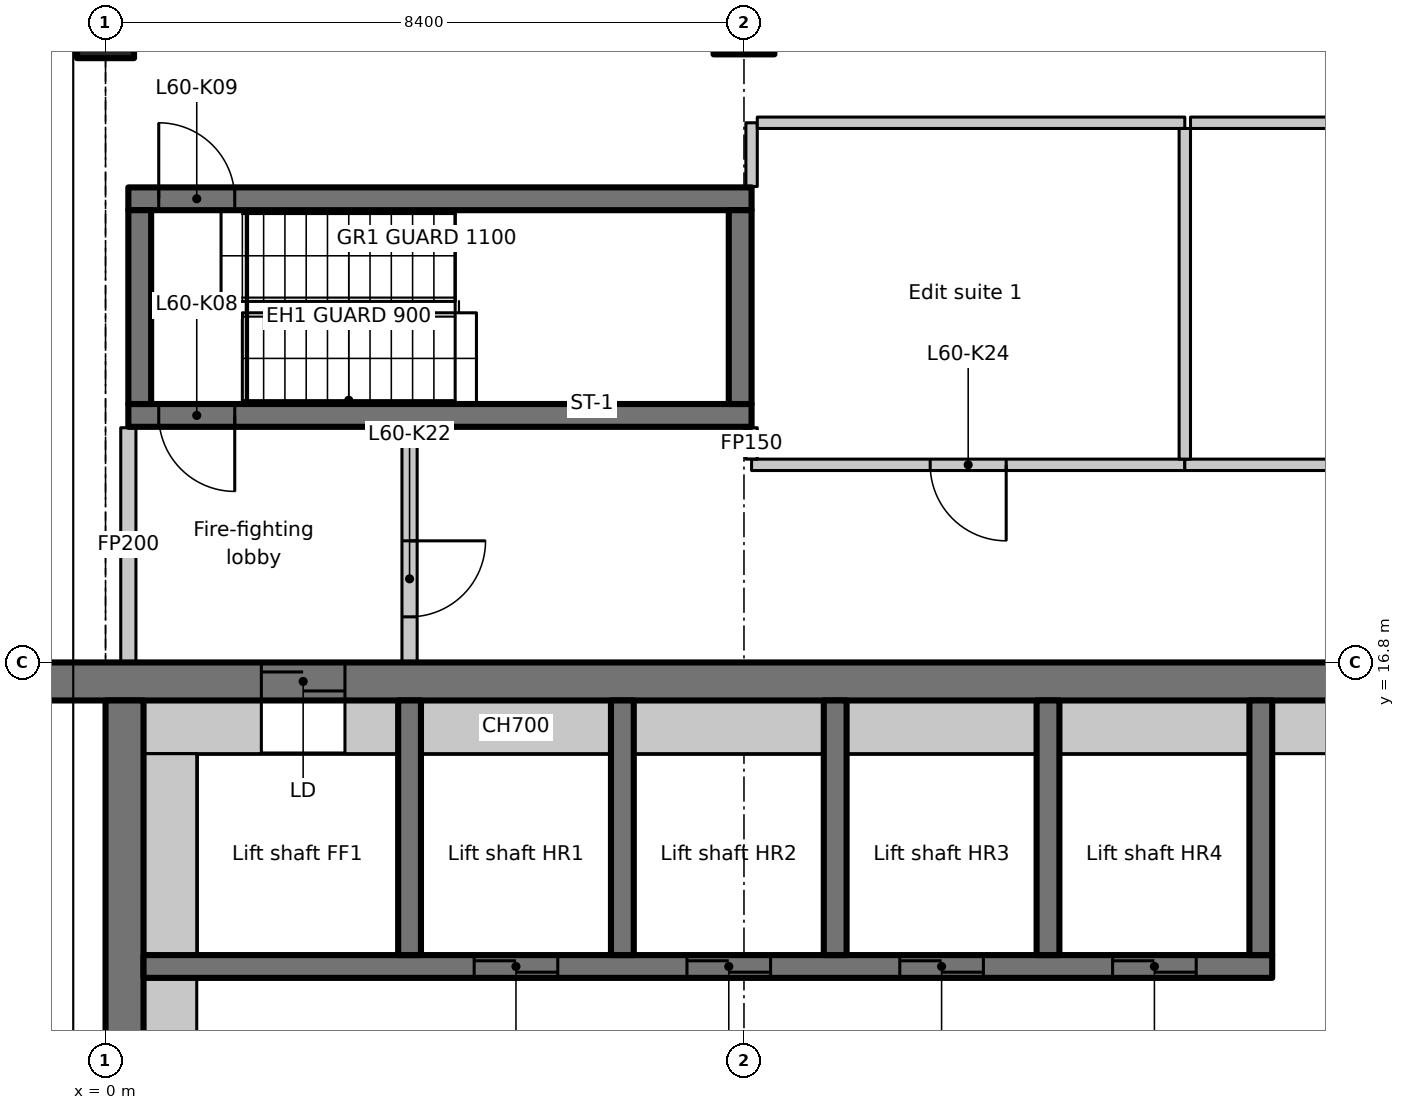
"""IFC4 building model, lengths in metres.
Left out: names, types, materials, properties, quantities, classifications, styles, units other than length and angle.
Written with IfcOpenShell. Run it as: python <this file> out.ifc"""

import sys

from ifc_helpers import new_model, si_unit, direction, frame, frame_2d, origin, origin_2d, place, context, subcontext, project, spatial, rectangle, extrude, element, fill, save


model = new_model("IFC4")
c1 = context("Model", 3, precision=1e-05, world=origin(), true_north=direction((0.0, 1.0)))
c2 = subcontext(c1, "Body", "Model", "MODEL_VIEW")
j1 = project(units=[si_unit("LENGTHUNIT", "METRE"), si_unit("PLANEANGLEUNIT", "RADIAN")], contexts=[c1])
p1 = place(None, origin())
s1 = spatial("IfcSite", under=j1, at=p1, CompositionType="ELEMENT")
p2 = place(p1, origin())
s2 = spatial("IfcBuilding", under=s1, at=p2, CompositionType="ELEMENT")
p3 = place(p2, frame((0.0, 0.0, 237.3)))
s3 = spatial("IfcBuildingStorey", under=s2, at=p3, CompositionType="ELEMENT", Elevation=237.3)
p4 = place(p3, frame((0.0, 25.2, 0.0), z_axis=(0.0, 0.0, 1.0), x_axis=(1.0, 0.0, 0.0)))
e1 = element("IfcColumn", 1, at=p4, inside=s3, PredefinedType="COLUMN", context=c2, shape_type="SweptSolid", body=[
    extrude(rectangle(XDim=0.75, YDim=0.9, at=origin_2d()), origin(), (0.0, 0.0, 1.0), 3.35),
])
p5 = place(p3, frame((8.4, 25.2, 0.0), z_axis=(0.0, 0.0, 1.0), x_axis=(1.0, 0.0, 0.0)))
e2 = element("IfcColumn", 2, at=p5, inside=s3, PredefinedType="COLUMN", context=c2, shape_type="SweptSolid", body=[
    extrude(rectangle(XDim=0.8, YDim=0.8, at=origin_2d()), origin(), (0.0, 0.0, 1.0), 3.35),
])
p6 = place(p3, frame((-1.1, 16.55, 0.0), z_axis=(0.0, 0.0, 1.0), x_axis=(1.0, 0.0, 0.0)))
e3 = element("IfcWall", 3, at=p6, inside=s3, PredefinedType="SHEAR", context=c2, shape_type="SweptSolid", body=[
    extrude(rectangle(XDim=22.1, YDim=0.5, at=frame_2d((11.05, 0.0))), origin(), (0.0, 0.0, 1.0), 3.35),
])
p7 = place(p6, frame((3.15, 0.0, 0.0)))
e4 = element("IfcOpeningElement", 4, at=p7, cuts=e3, PredefinedType="OPENING", context=c2, shape_type="SweptSolid", body=[
    extrude(rectangle(XDim=1.1, YDim=2.3, at=frame_2d((0.55, 1.15))), frame((0.0, 0.26, 0.0), z_axis=(0.0, -1.0, 0.0), x_axis=(1.0, 0.0, 0.0)), (0.0, 0.0, 1.0), 0.52),
])
p8 = place(p3, frame((0.25, 7.436, 0.0), z_axis=(0.0, 0.0, 1.0), x_axis=(0.0, 1.0, 0.0)))
e5 = element("IfcWall", 5, at=p8, inside=s3, PredefinedType="SHEAR", context=c2, shape_type="SweptSolid", body=[
    extrude(rectangle(XDim=8.864, YDim=0.5, at=frame_2d((4.432, 0.0))), origin(), (0.0, 0.0, 1.0), 3.35),
])
p9 = place(p3, frame((0.5, 15.95, 0.0), z_axis=(0.0, 0.0, 1.0), x_axis=(1.0, 0.0, 0.0)))
e6 = element("IfcWall", 6, at=p9, inside=s3, PredefinedType="PARTITIONING", context=c2, shape_type="SweptSolid", body=[
    extrude(rectangle(XDim=1.55, YDim=0.7, at=frame_2d((0.775, 0.0))), origin(), (0.0, 0.0, 1.0), 3.35),
])
p10 = place(p3, frame((0.5, 12.8, 0.0), z_axis=(0.0, 0.0, 1.0), x_axis=(1.0, 0.0, 0.0)))
e7 = element("IfcWall", 7, at=p10, inside=s3, PredefinedType="SHEAR", context=c2, shape_type="SweptSolid", body=[
    extrude(rectangle(XDim=14.85, YDim=0.3, at=frame_2d((7.425, 0.0))), origin(), (0.0, 0.0, 1.0), 3.35),
])
p11 = place(p10, frame((4.35, 0.0, 0.0)))
e8 = element("IfcOpeningElement", 8, at=p11, cuts=e7, PredefinedType="OPENING", context=c2, shape_type="SweptSolid", body=[
    extrude(rectangle(XDim=1.1, YDim=2.3, at=frame_2d((0.55, 1.15))), frame((0.0, 0.16, 0.0), z_axis=(0.0, -1.0, 0.0), x_axis=(1.0, 0.0, 0.0)), (0.0, 0.0, 1.0), 0.32),
])
p12 = place(p10, frame((7.15, 0.0, 0.0)))
e9 = element("IfcOpeningElement", 9, at=p12, cuts=e7, PredefinedType="OPENING", context=c2, shape_type="SweptSolid", body=[
    extrude(rectangle(XDim=1.1, YDim=2.3, at=frame_2d((0.55, 1.15))), frame((0.0, 0.16, 0.0), z_axis=(0.0, -1.0, 0.0), x_axis=(1.0, 0.0, 0.0)), (0.0, 0.0, 1.0), 0.32),
])
p13 = place(p10, frame((9.95, 0.0, 0.0)))
e10 = element("IfcOpeningElement", 10, at=p13, cuts=e7, PredefinedType="OPENING", context=c2, shape_type="SweptSolid", body=[
    extrude(rectangle(XDim=1.1, YDim=2.3, at=frame_2d((0.55, 1.15))), frame((0.0, 0.16, 0.0), z_axis=(0.0, -1.0, 0.0), x_axis=(1.0, 0.0, 0.0)), (0.0, 0.0, 1.0), 0.32),
])
p14 = place(p10, frame((12.75, 0.0, 0.0)))
e11 = element("IfcOpeningElement", 11, at=p14, cuts=e7, PredefinedType="OPENING", context=c2, shape_type="SweptSolid", body=[
    extrude(rectangle(XDim=1.1, YDim=2.3, at=frame_2d((0.55, 1.15))), frame((0.0, 0.16, 0.0), z_axis=(0.0, -1.0, 0.0), x_axis=(1.0, 0.0, 0.0)), (0.0, 0.0, 1.0), 0.32),
])
for number, where, z_axis, x_axis in (
    (12, (4.0, 12.95, 0.0), (0.0, 0.0, 1.0), (0.0, 1.0, 0.0)),
    (13, (6.8, 12.95, 0.0), (0.0, 0.0, 1.0), (0.0, 1.0, 0.0)),
    (14, (9.6, 12.95, 0.0), (0.0, 0.0, 1.0), (0.0, 1.0, 0.0)),
    (15, (12.4, 12.95, 0.0), (0.0, 0.0, 1.0), (0.0, 1.0, 0.0)),
    (16, (15.2, 12.95, 0.0), (0.0, 0.0, 1.0), (0.0, 1.0, 0.0)),
):
    element("IfcWall", number, at=place(p3, frame(where, z_axis=z_axis, x_axis=x_axis)), inside=s3, PredefinedType="SHEAR", context=c2, shape_type="SweptSolid", body=[
        extrude(rectangle(XDim=3.35, YDim=0.3, at=frame_2d((1.675, 0.0))), origin(), (0.0, 0.0, 1.0), 3.35),
    ])
p15 = place(p3, frame((8.5, 20.05, 0.0), z_axis=(0.0, 0.0, 1.0), x_axis=(-1.0, 0.0, 0.0)))
e17 = element("IfcWall", 17, at=p15, inside=s3, PredefinedType="SHEAR", context=c2, shape_type="SweptSolid", body=[
    extrude(rectangle(XDim=8.2, YDim=0.3, at=frame_2d((4.1, 0.0))), origin(), (0.0, 0.0, 1.0), 3.35),
])
p16 = place(p15, frame((6.8, 0.0, 0.0)))
e18 = element("IfcOpeningElement", 18, at=p16, cuts=e17, PredefinedType="OPENING", context=c2, shape_type="SweptSolid", body=[
    extrude(rectangle(XDim=1.0, YDim=2.1, at=frame_2d((0.5, 1.05))), frame((0.0, 0.16, 0.0), z_axis=(0.0, -1.0, 0.0), x_axis=(1.0, 0.0, 0.0)), (0.0, 0.0, 1.0), 0.32),
])
p17 = place(p3, frame((0.3, 22.9, 0.0), z_axis=(0.0, 0.0, 1.0), x_axis=(1.0, 0.0, 0.0)))
e19 = element("IfcWall", 19, at=p17, inside=s3, PredefinedType="SHEAR", context=c2, shape_type="SweptSolid", body=[
    extrude(rectangle(XDim=8.2, YDim=0.3, at=frame_2d((4.1, 0.0))), origin(), (0.0, 0.0, 1.0), 3.35),
])
p18 = place(p17, frame((0.4, 0.0, 0.0)))
e20 = element("IfcOpeningElement", 20, at=p18, cuts=e19, PredefinedType="OPENING", context=c2, shape_type="SweptSolid", body=[
    extrude(rectangle(XDim=1.0, YDim=2.1, at=frame_2d((0.5, 1.05))), frame((0.0, 0.16, 0.0), z_axis=(0.0, -1.0, 0.0), x_axis=(1.0, 0.0, 0.0)), (0.0, 0.0, 1.0), 0.32),
])
for number, where, z_axis, x_axis in (
    (21, (0.45, 20.2, 0.0), (0.0, 0.0, 1.0), (0.0, 1.0, 0.0)),
    (22, (8.35, 20.2, 0.0), (0.0, 0.0, 1.0), (0.0, 1.0, 0.0)),
):
    element("IfcWall", number, at=place(p3, frame(where, z_axis=z_axis, x_axis=x_axis)), inside=s3, PredefinedType="SHEAR", context=c2, shape_type="SweptSolid", body=[
        extrude(rectangle(XDim=2.55, YDim=0.3, at=frame_2d((1.275, 0.0))), origin(), (0.0, 0.0, 1.0), 3.35),
    ])
p19 = place(p3, frame((0.3, 16.812, 0.0), z_axis=(0.0, 0.0, 1.0), x_axis=(0.0, 1.0, 0.0)))
e23 = element("IfcWall", 23, at=p19, inside=s3, PredefinedType="PARTITIONING", context=c2, shape_type="SweptSolid", body=[
    extrude(rectangle(XDim=3.076, YDim=0.2, at=frame_2d((1.538, 0.0))), origin(), (0.0, 0.0, 1.0), 2.98),
])
p20 = place(p3, frame((4.0, 19.888, 0.0), z_axis=(0.0, 0.0, 1.0), x_axis=(0.0, -1.0, 0.0)))
e24 = element("IfcWall", 24, at=p20, inside=s3, PredefinedType="PARTITIONING", context=c2, shape_type="SweptSolid", body=[
    extrude(rectangle(XDim=3.076, YDim=0.2, at=frame_2d((1.538, 0.0))), origin(), (0.0, 0.0, 1.0), 3.35),
])
p21 = place(p20, frame((1.488, 0.0, 0.0)))
e25 = element("IfcOpeningElement", 25, at=p21, cuts=e24, PredefinedType="OPENING", context=c2, shape_type="SweptSolid", body=[
    extrude(rectangle(XDim=1.0, YDim=2.1, at=frame_2d((0.5, 1.05))), frame((0.0, 0.11, 0.0), z_axis=(0.0, -1.0, 0.0), x_axis=(1.0, 0.0, 0.0)), (0.0, 0.0, 1.0), 0.22),
])
p22 = place(p3, frame((14.2, 19.4, 0.0), z_axis=(0.0, 0.0, 1.0), x_axis=(-1.0, 0.0, 0.0)))
e26 = element("IfcWall", 26, at=p22, inside=s3, PredefinedType="PARTITIONING", context=c2, shape_type="SweptSolid", body=[
    extrude(rectangle(XDim=5.7, YDim=0.15, at=frame_2d((2.85, 0.0))), origin(), (0.0, 0.0, 1.0), 3.35),
])
p23 = place(p22, frame((2.35, 0.0, 0.0)))
e27 = element("IfcOpeningElement", 27, at=p23, cuts=e26, PredefinedType="OPENING", context=c2, shape_type="SweptSolid", body=[
    extrude(rectangle(XDim=1.0, YDim=2.1, at=frame_2d((0.5, 1.05))), frame((0.0, 0.085, 0.0), z_axis=(0.0, -1.0, 0.0), x_axis=(1.0, 0.0, 0.0)), (0.0, 0.0, 1.0), 0.17),
])
p24 = place(p3, frame((8.5, 19.475, 0.0), z_axis=(0.0, 0.0, 1.0), x_axis=(0.0, 1.0, 0.0)))
e28 = element("IfcWall", 28, at=p24, inside=s3, PredefinedType="PARTITIONING", context=c2, shape_type="SweptSolid", body=[
    extrude(rectangle(XDim=0.413, YDim=0.15, at=frame_2d((0.207, 0.0))), origin(), (0.0, 0.0, 1.0), 3.35),
])
p25 = place(p3, frame((8.5, 23.062, 0.0), z_axis=(0.0, 0.0, 1.0), x_axis=(0.0, 1.0, 0.0)))
e29 = element("IfcWall", 29, at=p25, inside=s3, PredefinedType="PARTITIONING", context=c2, shape_type="SweptSolid", body=[
    extrude(rectangle(XDim=0.838, YDim=0.15, at=frame_2d((0.419, 0.0))), origin(), (0.0, 0.0, 1.0), 3.35),
])
p26 = place(p3, frame((8.575, 23.9, 0.0), z_axis=(0.0, 0.0, 1.0), x_axis=(1.0, 0.0, 0.0)))
e30 = element("IfcWall", 30, at=p26, inside=s3, PredefinedType="PARTITIONING", context=c2, shape_type="SweptSolid", body=[
    extrude(rectangle(XDim=5.625, YDim=0.15, at=frame_2d((2.812, 0.0))), origin(), (0.0, 0.0, 1.0), 3.35),
])
p27 = place(p3, frame((19.925, 19.4, 0.0), z_axis=(0.0, 0.0, 1.0), x_axis=(-1.0, 0.0, 0.0)))
e31 = element("IfcWall", 31, at=p27, inside=s3, PredefinedType="PARTITIONING", context=c2, shape_type="SweptSolid", body=[
    extrude(rectangle(XDim=5.725, YDim=0.15, at=frame_2d((2.863, 0.0))), origin(), (0.0, 0.0, 1.0), 3.35),
])
p28 = place(p27, frame((2.325, 0.0, 0.0)))
e32 = element("IfcOpeningElement", 32, at=p28, cuts=e31, PredefinedType="OPENING", context=c2, shape_type="SweptSolid", body=[
    extrude(rectangle(XDim=1.0, YDim=2.1, at=frame_2d((0.5, 1.05))), frame((0.0, 0.085, 0.0), z_axis=(0.0, -1.0, 0.0), x_axis=(1.0, 0.0, 0.0)), (0.0, 0.0, 1.0), 0.17),
])
p29 = place(p3, frame((14.2, 23.825, 0.0), z_axis=(0.0, 0.0, 1.0), x_axis=(0.0, -1.0, 0.0)))
e33 = element("IfcWall", 33, at=p29, inside=s3, PredefinedType="PARTITIONING", context=c2, shape_type="SweptSolid", body=[
    extrude(rectangle(XDim=4.35, YDim=0.15, at=frame_2d((2.175, 0.0))), origin(), (0.0, 0.0, 1.0), 3.35),
])
p30 = place(p3, frame((14.275, 23.9, 0.0), z_axis=(0.0, 0.0, 1.0), x_axis=(1.0, 0.0, 0.0)))
e34 = element("IfcWall", 34, at=p30, inside=s3, PredefinedType="PARTITIONING", context=c2, shape_type="SweptSolid", body=[
    extrude(rectangle(XDim=5.725, YDim=0.15, at=frame_2d((2.863, 0.0))), origin(), (0.0, 0.0, 1.0), 3.35),
])
p31 = place(p3, frame((0.85, 7.436, 0.0), z_axis=(0.0, 0.0, 1.0), x_axis=(0.0, 1.0, 0.0)))
e35 = element("IfcWall", 35, at=p31, inside=s3, PredefinedType="PARTITIONING", context=c2, shape_type="SweptSolid", body=[
    extrude(rectangle(XDim=5.214, YDim=0.7, at=frame_2d((2.607, 0.0))), origin(), (0.0, 0.0, 1.0), 3.35),
])
p32 = place(p3, frame((0.85, 12.95, 0.0), z_axis=(0.0, 0.0, 1.0), x_axis=(0.0, 1.0, 0.0)))
e36 = element("IfcWall", 36, at=p32, inside=s3, PredefinedType="PARTITIONING", context=c2, shape_type="SweptSolid", body=[
    extrude(rectangle(XDim=2.65, YDim=0.7, at=frame_2d((1.325, 0.0))), origin(), (0.0, 0.0, 1.0), 3.35),
])
p33 = place(p3, frame((3.15, 15.95, 0.0), z_axis=(0.0, 0.0, 1.0), x_axis=(1.0, 0.0, 0.0)))
e37 = element("IfcWall", 37, at=p33, inside=s3, PredefinedType="PARTITIONING", context=c2, shape_type="SweptSolid", body=[
    extrude(rectangle(XDim=0.7, YDim=0.7, at=frame_2d((0.35, 0.0))), origin(), (0.0, 0.0, 1.0), 3.35),
])
for number, where, z_axis, x_axis in (
    (38, (4.15, 15.95, 0.0), (0.0, 0.0, 1.0), (1.0, 0.0, 0.0)),
    (39, (6.95, 15.95, 0.0), (0.0, 0.0, 1.0), (1.0, 0.0, 0.0)),
    (40, (9.75, 15.95, 0.0), (0.0, 0.0, 1.0), (1.0, 0.0, 0.0)),
    (41, (12.55, 15.95, 0.0), (0.0, 0.0, 1.0), (1.0, 0.0, 0.0)),
    (42, (15.35, 15.95, 0.0), (0.0, 0.0, 1.0), (1.0, 0.0, 0.0)),
):
    element("IfcWall", number, at=place(p3, frame(where, z_axis=z_axis, x_axis=x_axis)), inside=s3, PredefinedType="PARTITIONING", context=c2, shape_type="SweptSolid", body=[
        extrude(rectangle(XDim=2.5, YDim=0.7, at=frame_2d((1.25, 0.0))), origin(), (0.0, 0.0, 1.0), 3.35),
    ])
p34 = place(p7, origin())
e43 = element("IfcDoor", 43, at=p34, inside=s3, OperationType="SLIDING_TO_LEFT", PredefinedType="DOOR", context=c2, shape_type="SweptSolid", body=[
    extrude(rectangle(XDim=1.1, YDim=2.3, at=frame_2d((0.55, 1.15))), frame((0.0, 0.025, 0.0), z_axis=(0.0, -1.0, 0.0), x_axis=(1.0, 0.0, 0.0)), (0.0, 0.0, 1.0), 0.05),
])
fill(e4, e43)
p35 = place(p11, origin())
e44 = element("IfcDoor", 44, at=p35, inside=s3, OperationType="SLIDING_TO_LEFT", PredefinedType="DOOR", context=c2, shape_type="SweptSolid", body=[
    extrude(rectangle(XDim=1.1, YDim=2.3, at=frame_2d((0.55, 1.15))), frame((0.0, 0.025, 0.0), z_axis=(0.0, -1.0, 0.0), x_axis=(1.0, 0.0, 0.0)), (0.0, 0.0, 1.0), 0.05),
])
fill(e8, e44)
p36 = place(p12, origin())
e45 = element("IfcDoor", 45, at=p36, inside=s3, OperationType="SLIDING_TO_LEFT", PredefinedType="DOOR", context=c2, shape_type="SweptSolid", body=[
    extrude(rectangle(XDim=1.1, YDim=2.3, at=frame_2d((0.55, 1.15))), frame((0.0, 0.025, 0.0), z_axis=(0.0, -1.0, 0.0), x_axis=(1.0, 0.0, 0.0)), (0.0, 0.0, 1.0), 0.05),
])
fill(e9, e45)
p37 = place(p13, origin())
e46 = element("IfcDoor", 46, at=p37, inside=s3, OperationType="SLIDING_TO_LEFT", PredefinedType="DOOR", context=c2, shape_type="SweptSolid", body=[
    extrude(rectangle(XDim=1.1, YDim=2.3, at=frame_2d((0.55, 1.15))), frame((0.0, 0.025, 0.0), z_axis=(0.0, -1.0, 0.0), x_axis=(1.0, 0.0, 0.0)), (0.0, 0.0, 1.0), 0.05),
])
fill(e10, e46)
p38 = place(p14, origin())
e47 = element("IfcDoor", 47, at=p38, inside=s3, OperationType="SLIDING_TO_LEFT", PredefinedType="DOOR", context=c2, shape_type="SweptSolid", body=[
    extrude(rectangle(XDim=1.1, YDim=2.3, at=frame_2d((0.55, 1.15))), frame((0.0, 0.025, 0.0), z_axis=(0.0, -1.0, 0.0), x_axis=(1.0, 0.0, 0.0)), (0.0, 0.0, 1.0), 0.05),
])
fill(e11, e47)
p39 = place(p16, origin())
e48 = element("IfcDoor", 48, at=p39, inside=s3, OperationType="SINGLE_SWING_LEFT", PredefinedType="DOOR", context=c2, shape_type="SweptSolid", body=[
    extrude(rectangle(XDim=1.0, YDim=2.1, at=frame_2d((0.5, 1.05))), frame((0.0, 0.025, 0.0), z_axis=(0.0, -1.0, 0.0), x_axis=(1.0, 0.0, 0.0)), (0.0, 0.0, 1.0), 0.05),
])
fill(e18, e48)
p40 = place(p18, origin())
e49 = element("IfcDoor", 49, at=p40, inside=s3, OperationType="SINGLE_SWING_RIGHT", PredefinedType="DOOR", context=c2, shape_type="SweptSolid", body=[
    extrude(rectangle(XDim=1.0, YDim=2.1, at=frame_2d((0.5, 1.05))), frame((0.0, 0.025, 0.0), z_axis=(0.0, -1.0, 0.0), x_axis=(1.0, 0.0, 0.0)), (0.0, 0.0, 1.0), 0.05),
])
fill(e20, e49)
p41 = place(p21, origin())
e50 = element("IfcDoor", 50, at=p41, inside=s3, OperationType="SINGLE_SWING_LEFT", PredefinedType="DOOR", context=c2, shape_type="SweptSolid", body=[
    extrude(rectangle(XDim=1.0, YDim=2.1, at=frame_2d((0.5, 1.05))), frame((0.0, 0.025, 0.0), z_axis=(0.0, -1.0, 0.0), x_axis=(1.0, 0.0, 0.0)), (0.0, 0.0, 1.0), 0.05),
])
fill(e25, e50)
p42 = place(p23, origin())
e51 = element("IfcDoor", 51, at=p42, inside=s3, OperationType="SINGLE_SWING_LEFT", PredefinedType="DOOR", context=c2, shape_type="SweptSolid", body=[
    extrude(rectangle(XDim=1.0, YDim=2.1, at=frame_2d((0.5, 1.05))), frame((0.0, 0.025, 0.0), z_axis=(0.0, -1.0, 0.0), x_axis=(1.0, 0.0, 0.0)), (0.0, 0.0, 1.0), 0.05),
])
fill(e27, e51)
save(model, sys.argv[1])
